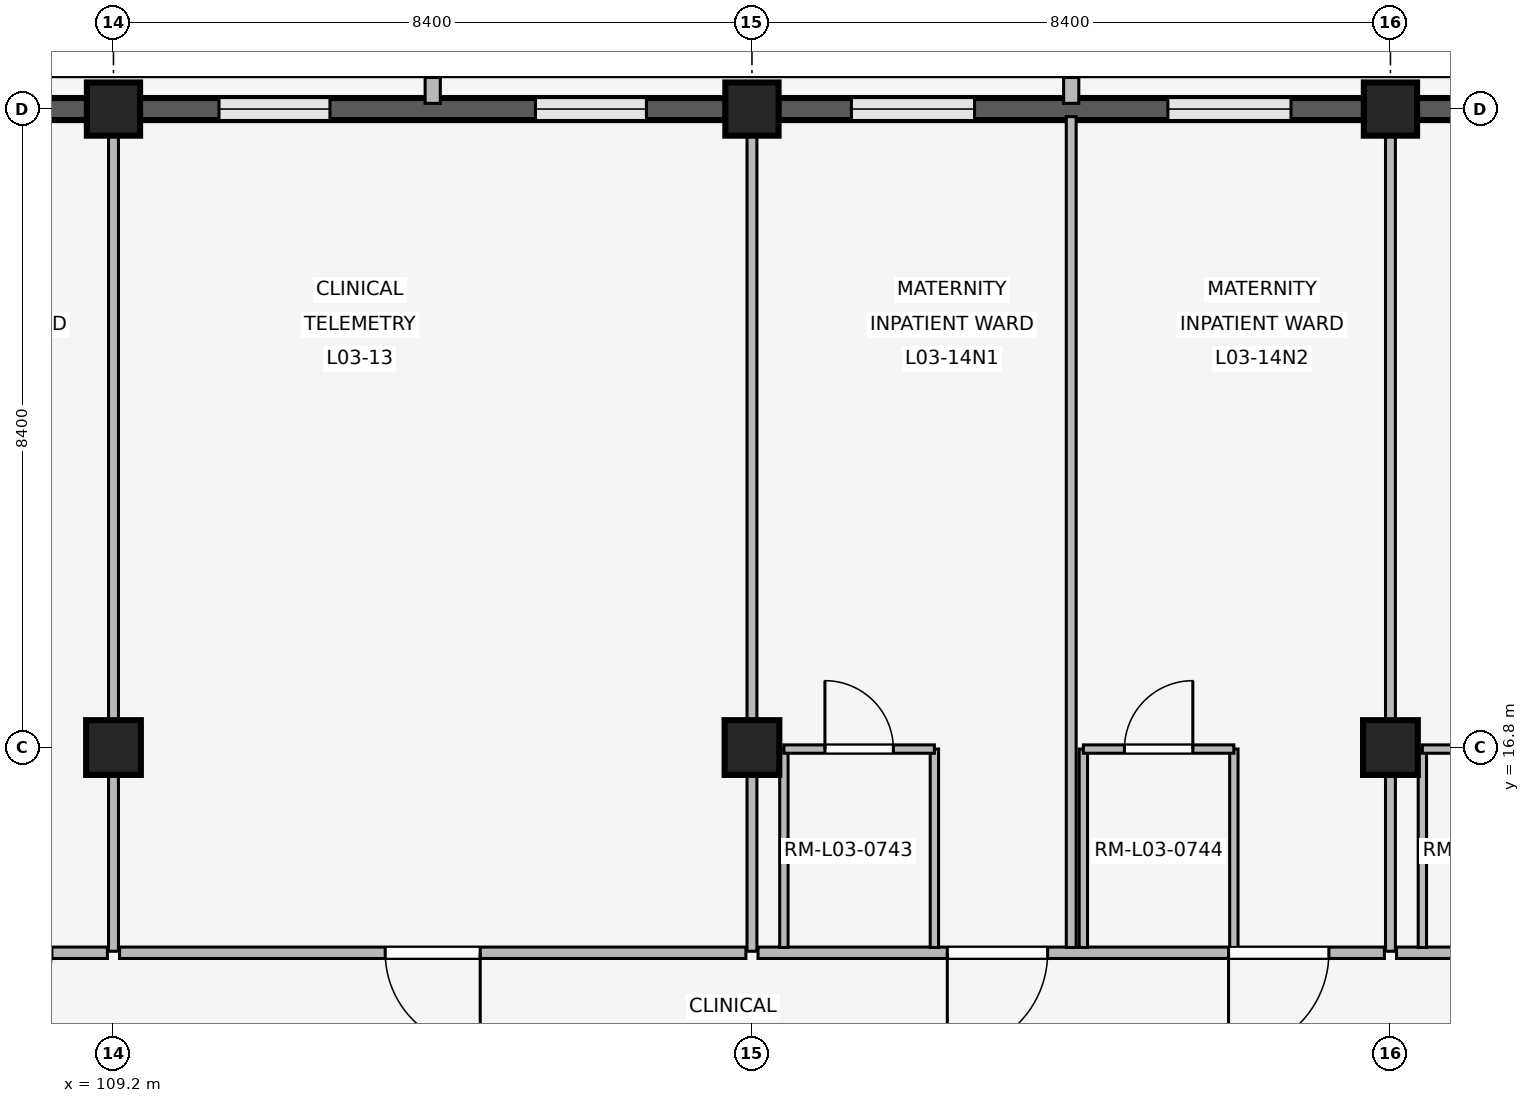
"""IFC4 building model, lengths in metres.
Left out: names, types, materials, properties, quantities, classifications, styles, units other than length and angle.
Written with IfcOpenShell. Run it as: python <this file> out.ifc"""

import sys

from ifc_helpers import new_model, si_unit, direction, frame, frame_2d, origin, origin_2d, place, context, subcontext, project, spatial, rectangle, extrude, element, fill, save


model = new_model("IFC4")
c1 = context("Model", 3, precision=1e-05, world=origin(), true_north=direction((0.0, 1.0)))
c2 = subcontext(c1, "Body", "Model", "MODEL_VIEW")
j1 = project(units=[si_unit("LENGTHUNIT", "METRE"), si_unit("PLANEANGLEUNIT", "RADIAN")], contexts=[c1])
p1 = place(None, origin())
s1 = spatial("IfcSite", under=j1, at=p1, CompositionType="ELEMENT")
p2 = place(p1, origin())
s2 = spatial("IfcBuilding", under=s1, at=p2, CompositionType="ELEMENT")
p3 = place(p2, frame((0.0, 0.0, 12.9)))
s3 = spatial("IfcBuildingStorey", under=s2, at=p3, CompositionType="ELEMENT", Elevation=12.9)
p4 = place(p3, frame((109.2, 16.8, 0.0), z_axis=(0.0, 0.0, 1.0), x_axis=(1.0, 0.0, 0.0)))
e1 = element("IfcColumn", 1, at=p4, inside=s3, PredefinedType="COLUMN", context=c2, shape_type="SweptSolid", body=[
    extrude(rectangle(XDim=0.72, YDim=0.72, at=origin_2d()), origin(), (0.0, 0.0, 1.0), 3.3),
])
p5 = place(p3, frame((109.2, 25.2, 0.0), z_axis=(0.0, 0.0, 1.0), x_axis=(1.0, 0.0, 0.0)))
e2 = element("IfcColumn", 2, at=p5, inside=s3, PredefinedType="COLUMN", context=c2, shape_type="SweptSolid", body=[
    extrude(rectangle(XDim=0.7, YDim=0.7, at=origin_2d()), origin(), (0.0, 0.0, 1.0), 3.3),
])
p6 = place(p3, frame((117.6, 16.8, 0.0), z_axis=(0.0, 0.0, 1.0), x_axis=(1.0, 0.0, 0.0)))
e3 = element("IfcColumn", 3, at=p6, inside=s3, PredefinedType="COLUMN", context=c2, shape_type="SweptSolid", body=[
    extrude(rectangle(XDim=0.72, YDim=0.72, at=origin_2d()), origin(), (0.0, 0.0, 1.0), 3.3),
])
p7 = place(p3, frame((117.6, 25.2, 0.0), z_axis=(0.0, 0.0, 1.0), x_axis=(1.0, 0.0, 0.0)))
e4 = element("IfcColumn", 4, at=p7, inside=s3, PredefinedType="COLUMN", context=c2, shape_type="SweptSolid", body=[
    extrude(rectangle(XDim=0.7, YDim=0.7, at=origin_2d()), origin(), (0.0, 0.0, 1.0), 3.3),
])
p8 = place(p3, frame((126.0, 16.8, 0.0), z_axis=(0.0, 0.0, 1.0), x_axis=(1.0, 0.0, 0.0)))
e5 = element("IfcColumn", 5, at=p8, inside=s3, PredefinedType="COLUMN", context=c2, shape_type="SweptSolid", body=[
    extrude(rectangle(XDim=0.72, YDim=0.72, at=origin_2d()), origin(), (0.0, 0.0, 1.0), 3.3),
])
p9 = place(p3, frame((126.0, 25.2, 0.0), z_axis=(0.0, 0.0, 1.0), x_axis=(1.0, 0.0, 0.0)))
e6 = element("IfcColumn", 6, at=p9, inside=s3, PredefinedType="COLUMN", context=c2, shape_type="SweptSolid", body=[
    extrude(rectangle(XDim=0.7, YDim=0.7, at=origin_2d()), origin(), (0.0, 0.0, 1.0), 3.3),
])
p10 = place(p3, frame((101.145, 25.2, 0.0), z_axis=(0.0, 0.0, 1.0), x_axis=(1.0, 0.0, 0.0)))
e7 = element("IfcWall", 7, at=p10, inside=s3, PredefinedType="SOLIDWALL", context=c2, shape_type="SweptSolid", body=[
    extrude(rectangle(XDim=7.71, YDim=0.29, at=frame_2d((3.855, 0.0))), origin(), (0.0, 0.0, 1.0), 2.44),
])
p11 = place(p10, frame((0.963, 0.0, 0.85)))
e8 = element("IfcOpeningElement", 8, at=p11, cuts=e7, PredefinedType="OPENING", context=c2, shape_type="SweptSolid", body=[
    extrude(rectangle(XDim=1.62, YDim=0.95, at=frame_2d((0.81, 0.475))), frame((0.0, 0.155, 0.0), z_axis=(0.0, -1.0, 0.0), x_axis=(1.0, 0.0, 0.0)), (0.0, 0.0, 1.0), 0.31),
])
p12 = place(p10, frame((5.127, 0.0, 0.85)))
e9 = element("IfcOpeningElement", 9, at=p12, cuts=e7, PredefinedType="OPENING", context=c2, shape_type="SweptSolid", body=[
    extrude(rectangle(XDim=1.62, YDim=0.95, at=frame_2d((0.81, 0.475))), frame((0.0, 0.155, 0.0), z_axis=(0.0, -1.0, 0.0), x_axis=(1.0, 0.0, 0.0)), (0.0, 0.0, 1.0), 0.31),
])
p13 = place(p3, frame((109.545, 25.2, 0.0), z_axis=(0.0, 0.0, 1.0), x_axis=(1.0, 0.0, 0.0)))
e10 = element("IfcWall", 10, at=p13, inside=s3, PredefinedType="SOLIDWALL", context=c2, shape_type="SweptSolid", body=[
    extrude(rectangle(XDim=7.71, YDim=0.29, at=frame_2d((3.855, 0.0))), origin(), (0.0, 0.0, 1.0), 2.44),
])
p14 = place(p13, frame((1.043, 0.0, 0.85)))
e11 = element("IfcOpeningElement", 11, at=p14, cuts=e10, PredefinedType="OPENING", context=c2, shape_type="SweptSolid", body=[
    extrude(rectangle(XDim=1.46, YDim=0.85, at=frame_2d((0.73, 0.425))), frame((0.0, 0.155, 0.0), z_axis=(0.0, -1.0, 0.0), x_axis=(1.0, 0.0, 0.0)), (0.0, 0.0, 1.0), 0.31),
])
p15 = place(p13, frame((5.207, 0.0, 0.85)))
e12 = element("IfcOpeningElement", 12, at=p15, cuts=e10, PredefinedType="OPENING", context=c2, shape_type="SweptSolid", body=[
    extrude(rectangle(XDim=1.46, YDim=0.85, at=frame_2d((0.73, 0.425))), frame((0.0, 0.155, 0.0), z_axis=(0.0, -1.0, 0.0), x_axis=(1.0, 0.0, 0.0)), (0.0, 0.0, 1.0), 0.31),
])
p16 = place(p3, frame((113.4, 25.275, 0.0), z_axis=(0.0, 0.0, 1.0), x_axis=(0.0, 1.0, 0.0)))
e13 = element("IfcWall", 13, at=p16, inside=s3, PredefinedType="ELEMENTEDWALL", context=c2, shape_type="SweptSolid", body=[
    extrude(rectangle(XDim=0.34, YDim=0.2, at=frame_2d((0.17, 0.0))), origin(), (0.0, 0.0, 1.0), 2.42),
])
p17 = place(p3, frame((117.945, 25.2, 0.0), z_axis=(0.0, 0.0, 1.0), x_axis=(1.0, 0.0, 0.0)))
e14 = element("IfcWall", 14, at=p17, inside=s3, PredefinedType="SOLIDWALL", context=c2, shape_type="SweptSolid", body=[
    extrude(rectangle(XDim=7.71, YDim=0.29, at=frame_2d((3.855, 0.0))), origin(), (0.0, 0.0, 1.0), 2.44),
])
p18 = place(p17, frame((0.963, 0.0, 0.85)))
e15 = element("IfcOpeningElement", 15, at=p18, cuts=e14, PredefinedType="OPENING", context=c2, shape_type="SweptSolid", body=[
    extrude(rectangle(XDim=1.62, YDim=0.95, at=frame_2d((0.81, 0.475))), frame((0.0, 0.155, 0.0), z_axis=(0.0, -1.0, 0.0), x_axis=(1.0, 0.0, 0.0)), (0.0, 0.0, 1.0), 0.31),
])
p19 = place(p17, frame((5.127, 0.0, 0.85)))
e16 = element("IfcOpeningElement", 16, at=p19, cuts=e14, PredefinedType="OPENING", context=c2, shape_type="SweptSolid", body=[
    extrude(rectangle(XDim=1.62, YDim=0.95, at=frame_2d((0.81, 0.475))), frame((0.0, 0.155, 0.0), z_axis=(0.0, -1.0, 0.0), x_axis=(1.0, 0.0, 0.0)), (0.0, 0.0, 1.0), 0.31),
])
p20 = place(p3, frame((121.8, 25.275, 0.0), z_axis=(0.0, 0.0, 1.0), x_axis=(0.0, 1.0, 0.0)))
e17 = element("IfcWall", 17, at=p20, inside=s3, PredefinedType="ELEMENTEDWALL", context=c2, shape_type="SweptSolid", body=[
    extrude(rectangle(XDim=0.34, YDim=0.2, at=frame_2d((0.17, 0.0))), origin(), (0.0, 0.0, 1.0), 2.42),
])
p21 = place(p3, frame((126.345, 25.2, 0.0), z_axis=(0.0, 0.0, 1.0), x_axis=(1.0, 0.0, 0.0)))
e18 = element("IfcWall", 18, at=p21, inside=s3, PredefinedType="SOLIDWALL", context=c2, shape_type="SweptSolid", body=[
    extrude(rectangle(XDim=7.71, YDim=0.29, at=frame_2d((3.855, 0.0))), origin(), (0.0, 0.0, 1.0), 2.44),
])
p22 = place(p21, frame((1.043, 0.0, 0.85)))
e19 = element("IfcOpeningElement", 19, at=p22, cuts=e18, PredefinedType="OPENING", context=c2, shape_type="SweptSolid", body=[
    extrude(rectangle(XDim=1.46, YDim=0.85, at=frame_2d((0.73, 0.425))), frame((0.0, 0.155, 0.0), z_axis=(0.0, -1.0, 0.0), x_axis=(1.0, 0.0, 0.0)), (0.0, 0.0, 1.0), 0.31),
])
p23 = place(p21, frame((5.207, 0.0, 0.85)))
e20 = element("IfcOpeningElement", 20, at=p23, cuts=e18, PredefinedType="OPENING", context=c2, shape_type="SweptSolid", body=[
    extrude(rectangle(XDim=1.46, YDim=0.85, at=frame_2d((0.73, 0.425))), frame((0.0, 0.155, 0.0), z_axis=(0.0, -1.0, 0.0), x_axis=(1.0, 0.0, 0.0)), (0.0, 0.0, 1.0), 0.31),
])
p24 = place(p3, frame((109.12, 14.1, 0.0), z_axis=(0.0, 0.0, 1.0), x_axis=(-1.0, 0.0, 0.0)))
e21 = element("IfcWall", 21, at=p24, inside=s3, PredefinedType="PARTITIONING", context=c2, shape_type="SweptSolid", body=[
    extrude(rectangle(XDim=7.96, YDim=0.15, at=frame_2d((3.98, 0.0))), origin(), (0.0, 0.0, 1.0), 2.42),
])
p25 = place(p24, frame((0.73, 0.0, 0.0)))
e22 = element("IfcOpeningElement", 22, at=p25, cuts=e21, PredefinedType="OPENING", context=c2, shape_type="SweptSolid", body=[
    extrude(rectangle(XDim=1.32, YDim=2.25, at=frame_2d((0.66, 1.125))), frame((0.0, 0.085, 0.0), z_axis=(0.0, -1.0, 0.0), x_axis=(1.0, 0.0, 0.0)), (0.0, 0.0, 1.0), 0.17),
])
p26 = place(p24, frame((4.43, 0.0, 0.0)))
e23 = element("IfcOpeningElement", 23, at=p26, cuts=e21, PredefinedType="OPENING", context=c2, shape_type="SweptSolid", body=[
    extrude(rectangle(XDim=1.32, YDim=2.25, at=frame_2d((0.66, 1.125))), frame((0.0, 0.085, 0.0), z_axis=(0.0, -1.0, 0.0), x_axis=(1.0, 0.0, 0.0)), (0.0, 0.0, 1.0), 0.17),
])
p27 = place(p3, frame((109.2, 14.12, 0.0), z_axis=(0.0, 0.0, 1.0), x_axis=(0.0, 1.0, 0.0)))
e24 = element("IfcWall", 24, at=p27, inside=s3, PredefinedType="PARTITIONING", context=c2, shape_type="SweptSolid", body=[
    extrude(rectangle(XDim=10.94, YDim=0.13, at=frame_2d((5.47, 0.0))), origin(), (0.0, 0.0, 1.0), 2.42),
])
p28 = place(p3, frame((117.52, 14.1, 0.0), z_axis=(0.0, 0.0, 1.0), x_axis=(-1.0, 0.0, 0.0)))
e25 = element("IfcWall", 25, at=p28, inside=s3, PredefinedType="PARTITIONING", context=c2, shape_type="SweptSolid", body=[
    extrude(rectangle(XDim=8.24, YDim=0.15, at=frame_2d((4.12, 0.0))), origin(), (0.0, 0.0, 1.0), 2.42),
])
p29 = place(p28, frame((3.495, 0.0, 0.0)))
e26 = element("IfcOpeningElement", 26, at=p29, cuts=e25, PredefinedType="OPENING", context=c2, shape_type="SweptSolid", body=[
    extrude(rectangle(XDim=1.25, YDim=2.2, at=frame_2d((0.625, 1.1))), frame((0.0, 0.085, 0.0), z_axis=(0.0, -1.0, 0.0), x_axis=(1.0, 0.0, 0.0)), (0.0, 0.0, 1.0), 0.17),
])
p30 = place(p3, frame((117.6, 14.12, 0.0), z_axis=(0.0, 0.0, 1.0), x_axis=(0.0, 1.0, 0.0)))
e27 = element("IfcWall", 27, at=p30, inside=s3, PredefinedType="PARTITIONING", context=c2, shape_type="SweptSolid", body=[
    extrude(rectangle(XDim=10.94, YDim=0.13, at=frame_2d((5.47, 0.0))), origin(), (0.0, 0.0, 1.0), 2.42),
])
p31 = place(p3, frame((125.92, 14.1, 0.0), z_axis=(0.0, 0.0, 1.0), x_axis=(-1.0, 0.0, 0.0)))
e28 = element("IfcWall", 28, at=p31, inside=s3, PredefinedType="PARTITIONING", context=c2, shape_type="SweptSolid", body=[
    extrude(rectangle(XDim=8.24, YDim=0.15, at=frame_2d((4.12, 0.0))), origin(), (0.0, 0.0, 1.0), 2.42),
])
p32 = place(p31, frame((0.73, 0.0, 0.0)))
e29 = element("IfcOpeningElement", 29, at=p32, cuts=e28, PredefinedType="OPENING", context=c2, shape_type="SweptSolid", body=[
    extrude(rectangle(XDim=1.32, YDim=2.25, at=frame_2d((0.66, 1.125))), frame((0.0, 0.085, 0.0), z_axis=(0.0, -1.0, 0.0), x_axis=(1.0, 0.0, 0.0)), (0.0, 0.0, 1.0), 0.17),
])
p33 = place(p31, frame((4.43, 0.0, 0.0)))
e30 = element("IfcOpeningElement", 30, at=p33, cuts=e28, PredefinedType="OPENING", context=c2, shape_type="SweptSolid", body=[
    extrude(rectangle(XDim=1.32, YDim=2.25, at=frame_2d((0.66, 1.125))), frame((0.0, 0.085, 0.0), z_axis=(0.0, -1.0, 0.0), x_axis=(1.0, 0.0, 0.0)), (0.0, 0.0, 1.0), 0.17),
])
p34 = place(p3, frame((121.8, 14.17, 0.0), z_axis=(0.0, 0.0, 1.0), x_axis=(0.0, 1.0, 0.0)))
e31 = element("IfcWall", 31, at=p34, inside=s3, PredefinedType="PARTITIONING", context=c2, shape_type="SweptSolid", body=[
    extrude(rectangle(XDim=10.93, YDim=0.13, at=frame_2d((5.465, 0.0))), origin(), (0.0, 0.0, 1.0), 2.42),
])
for number, where, z_axis, x_axis in (
    (32, (118.02, 14.17, 0.0), (0.0, 0.0, 1.0), (0.0, 1.0, 0.0)),
    (33, (120.0, 14.17, 0.0), (0.0, 0.0, 1.0), (0.0, 1.0, 0.0)),
):
    element("IfcWall", number, at=place(p3, frame(where, z_axis=z_axis, x_axis=x_axis)), inside=s3, PredefinedType="PARTITIONING", context=c2, shape_type="SweptSolid", body=[
        extrude(rectangle(XDim=2.61, YDim=0.11, at=frame_2d((1.305, 0.0))), origin(), (0.0, 0.0, 1.0), 2.42),
    ])
p35 = place(p3, frame((118.02, 16.78, 0.0), z_axis=(0.0, 0.0, 1.0), x_axis=(1.0, 0.0, 0.0)))
e34 = element("IfcWall", 34, at=p35, inside=s3, PredefinedType="PARTITIONING", context=c2, shape_type="SweptSolid", body=[
    extrude(rectangle(XDim=1.98, YDim=0.11, at=frame_2d((0.99, 0.0))), origin(), (0.0, 0.0, 1.0), 2.42),
])
p36 = place(p35, frame((0.54, 0.0, 0.0)))
e35 = element("IfcOpeningElement", 35, at=p36, cuts=e34, PredefinedType="OPENING", context=c2, shape_type="SweptSolid", body=[
    extrude(rectangle(XDim=0.9, YDim=2.1, at=frame_2d((0.45, 1.05))), frame((0.0, 0.065, 0.0), z_axis=(0.0, -1.0, 0.0), x_axis=(1.0, 0.0, 0.0)), (0.0, 0.0, 1.0), 0.13),
])
for number, where, z_axis, x_axis in (
    (36, (121.96, 14.17, 0.0), (0.0, 0.0, 1.0), (0.0, 1.0, 0.0)),
    (37, (123.94, 14.17, 0.0), (0.0, 0.0, 1.0), (0.0, 1.0, 0.0)),
):
    element("IfcWall", number, at=place(p3, frame(where, z_axis=z_axis, x_axis=x_axis)), inside=s3, PredefinedType="PARTITIONING", context=c2, shape_type="SweptSolid", body=[
        extrude(rectangle(XDim=2.61, YDim=0.11, at=frame_2d((1.305, 0.0))), origin(), (0.0, 0.0, 1.0), 2.42),
    ])
p37 = place(p3, frame((121.96, 16.78, 0.0), z_axis=(0.0, 0.0, 1.0), x_axis=(1.0, 0.0, 0.0)))
e38 = element("IfcWall", 38, at=p37, inside=s3, PredefinedType="PARTITIONING", context=c2, shape_type="SweptSolid", body=[
    extrude(rectangle(XDim=1.98, YDim=0.11, at=frame_2d((0.99, 0.0))), origin(), (0.0, 0.0, 1.0), 2.42),
])
p38 = place(p37, frame((0.54, 0.0, 0.0)))
e39 = element("IfcOpeningElement", 39, at=p38, cuts=e38, PredefinedType="OPENING", context=c2, shape_type="SweptSolid", body=[
    extrude(rectangle(XDim=0.9, YDim=2.1, at=frame_2d((0.45, 1.05))), frame((0.0, 0.065, 0.0), z_axis=(0.0, -1.0, 0.0), x_axis=(1.0, 0.0, 0.0)), (0.0, 0.0, 1.0), 0.13),
])
p39 = place(p3, frame((126.0, 14.12, 0.0), z_axis=(0.0, 0.0, 1.0), x_axis=(0.0, 1.0, 0.0)))
e40 = element("IfcWall", 40, at=p39, inside=s3, PredefinedType="PARTITIONING", context=c2, shape_type="SweptSolid", body=[
    extrude(rectangle(XDim=10.94, YDim=0.13, at=frame_2d((5.47, 0.0))), origin(), (0.0, 0.0, 1.0), 2.42),
])
p40 = place(p3, frame((134.26, 14.1, 0.0), z_axis=(0.0, 0.0, 1.0), x_axis=(-1.0, 0.0, 0.0)))
e41 = element("IfcWall", 41, at=p40, inside=s3, PredefinedType="PARTITIONING", context=c2, shape_type="SweptSolid", body=[
    extrude(rectangle(XDim=8.18, YDim=0.15, at=frame_2d((4.09, 0.0))), origin(), (0.0, 0.0, 1.0), 2.42),
])
p41 = place(p40, frame((0.67, 0.0, 0.0)))
e42 = element("IfcOpeningElement", 42, at=p41, cuts=e41, PredefinedType="OPENING", context=c2, shape_type="SweptSolid", body=[
    extrude(rectangle(XDim=1.32, YDim=2.25, at=frame_2d((0.66, 1.125))), frame((0.0, 0.085, 0.0), z_axis=(0.0, -1.0, 0.0), x_axis=(1.0, 0.0, 0.0)), (0.0, 0.0, 1.0), 0.17),
])
p42 = place(p40, frame((4.37, 0.0, 0.0)))
e43 = element("IfcOpeningElement", 43, at=p42, cuts=e41, PredefinedType="OPENING", context=c2, shape_type="SweptSolid", body=[
    extrude(rectangle(XDim=1.32, YDim=2.25, at=frame_2d((0.66, 1.125))), frame((0.0, 0.085, 0.0), z_axis=(0.0, -1.0, 0.0), x_axis=(1.0, 0.0, 0.0)), (0.0, 0.0, 1.0), 0.17),
])
p43 = place(p3, frame((126.42, 14.17, 0.0), z_axis=(0.0, 0.0, 1.0), x_axis=(0.0, 1.0, 0.0)))
e44 = element("IfcWall", 44, at=p43, inside=s3, PredefinedType="PARTITIONING", context=c2, shape_type="SweptSolid", body=[
    extrude(rectangle(XDim=2.61, YDim=0.11, at=frame_2d((1.305, 0.0))), origin(), (0.0, 0.0, 1.0), 2.42),
])
p44 = place(p3, frame((126.42, 16.78, 0.0), z_axis=(0.0, 0.0, 1.0), x_axis=(1.0, 0.0, 0.0)))
e45 = element("IfcWall", 45, at=p44, inside=s3, PredefinedType="PARTITIONING", context=c2, shape_type="SweptSolid", body=[
    extrude(rectangle(XDim=1.98, YDim=0.11, at=frame_2d((0.99, 0.0))), origin(), (0.0, 0.0, 1.0), 2.42),
])
p45 = place(p44, frame((0.54, 0.0, 0.0)))
e46 = element("IfcOpeningElement", 46, at=p45, cuts=e45, PredefinedType="OPENING", context=c2, shape_type="SweptSolid", body=[
    extrude(rectangle(XDim=0.9, YDim=2.1, at=frame_2d((0.45, 1.05))), frame((0.0, 0.065, 0.0), z_axis=(0.0, -1.0, 0.0), x_axis=(1.0, 0.0, 0.0)), (0.0, 0.0, 1.0), 0.13),
])
p46 = place(p14, origin())
e47 = element("IfcWindow", 47, at=p46, inside=s3, PartitioningType="SINGLE_PANEL", PredefinedType="WINDOW", context=c2, shape_type="SweptSolid", body=[
    extrude(rectangle(XDim=1.46, YDim=0.85, at=frame_2d((0.73, 0.425))), frame((0.0, 0.03, 0.0), z_axis=(0.0, -1.0, 0.0), x_axis=(1.0, 0.0, 0.0)), (0.0, 0.0, 1.0), 0.06),
])
fill(e11, e47)
p47 = place(p15, origin())
e48 = element("IfcWindow", 48, at=p47, inside=s3, PartitioningType="SINGLE_PANEL", PredefinedType="WINDOW", context=c2, shape_type="SweptSolid", body=[
    extrude(rectangle(XDim=1.46, YDim=0.85, at=frame_2d((0.73, 0.425))), frame((0.0, 0.03, 0.0), z_axis=(0.0, -1.0, 0.0), x_axis=(1.0, 0.0, 0.0)), (0.0, 0.0, 1.0), 0.06),
])
fill(e12, e48)
p48 = place(p18, origin())
e49 = element("IfcWindow", 49, at=p48, inside=s3, PartitioningType="SINGLE_PANEL", PredefinedType="WINDOW", context=c2, shape_type="SweptSolid", body=[
    extrude(rectangle(XDim=1.62, YDim=0.95, at=frame_2d((0.81, 0.475))), frame((0.0, 0.03, 0.0), z_axis=(0.0, -1.0, 0.0), x_axis=(1.0, 0.0, 0.0)), (0.0, 0.0, 1.0), 0.06),
])
fill(e15, e49)
p49 = place(p19, origin())
e50 = element("IfcWindow", 50, at=p49, inside=s3, PartitioningType="SINGLE_PANEL", PredefinedType="WINDOW", context=c2, shape_type="SweptSolid", body=[
    extrude(rectangle(XDim=1.62, YDim=0.95, at=frame_2d((0.81, 0.475))), frame((0.0, 0.03, 0.0), z_axis=(0.0, -1.0, 0.0), x_axis=(1.0, 0.0, 0.0)), (0.0, 0.0, 1.0), 0.06),
])
fill(e16, e50)
p50 = place(p29, origin())
e51 = element("IfcDoor", 51, at=p50, inside=s3, OperationType="SINGLE_SWING_LEFT", PredefinedType="DOOR", context=c2, shape_type="SweptSolid", body=[
    extrude(rectangle(XDim=1.25, YDim=2.2, at=frame_2d((0.625, 1.1))), frame((0.0, 0.025, 0.0), z_axis=(0.0, -1.0, 0.0), x_axis=(1.0, 0.0, 0.0)), (0.0, 0.0, 1.0), 0.05),
])
fill(e26, e51)
p51 = place(p32, origin())
e52 = element("IfcDoor", 52, at=p51, inside=s3, OperationType="SINGLE_SWING_RIGHT", PredefinedType="DOOR", context=c2, shape_type="SweptSolid", body=[
    extrude(rectangle(XDim=1.32, YDim=2.25, at=frame_2d((0.66, 1.125))), frame((0.0, 0.025, 0.0), z_axis=(0.0, -1.0, 0.0), x_axis=(1.0, 0.0, 0.0)), (0.0, 0.0, 1.0), 0.05),
])
fill(e29, e52)
p52 = place(p33, origin())
e53 = element("IfcDoor", 53, at=p52, inside=s3, OperationType="SINGLE_SWING_RIGHT", PredefinedType="DOOR", context=c2, shape_type="SweptSolid", body=[
    extrude(rectangle(XDim=1.32, YDim=2.25, at=frame_2d((0.66, 1.125))), frame((0.0, 0.025, 0.0), z_axis=(0.0, -1.0, 0.0), x_axis=(1.0, 0.0, 0.0)), (0.0, 0.0, 1.0), 0.05),
])
fill(e30, e53)
p53 = place(p36, origin())
e54 = element("IfcDoor", 54, at=p53, inside=s3, OperationType="SINGLE_SWING_LEFT", PredefinedType="DOOR", context=c2, shape_type="SweptSolid", body=[
    extrude(rectangle(XDim=0.9, YDim=2.1, at=frame_2d((0.45, 1.05))), frame((0.0, 0.025, 0.0), z_axis=(0.0, -1.0, 0.0), x_axis=(1.0, 0.0, 0.0)), (0.0, 0.0, 1.0), 0.05),
])
fill(e35, e54)
p54 = place(p38, origin())
e55 = element("IfcDoor", 55, at=p54, inside=s3, OperationType="SINGLE_SWING_RIGHT", PredefinedType="DOOR", context=c2, shape_type="SweptSolid", body=[
    extrude(rectangle(XDim=0.9, YDim=2.1, at=frame_2d((0.45, 1.05))), frame((0.0, 0.025, 0.0), z_axis=(0.0, -1.0, 0.0), x_axis=(1.0, 0.0, 0.0)), (0.0, 0.0, 1.0), 0.05),
])
fill(e39, e55)
save(model, sys.argv[1])
